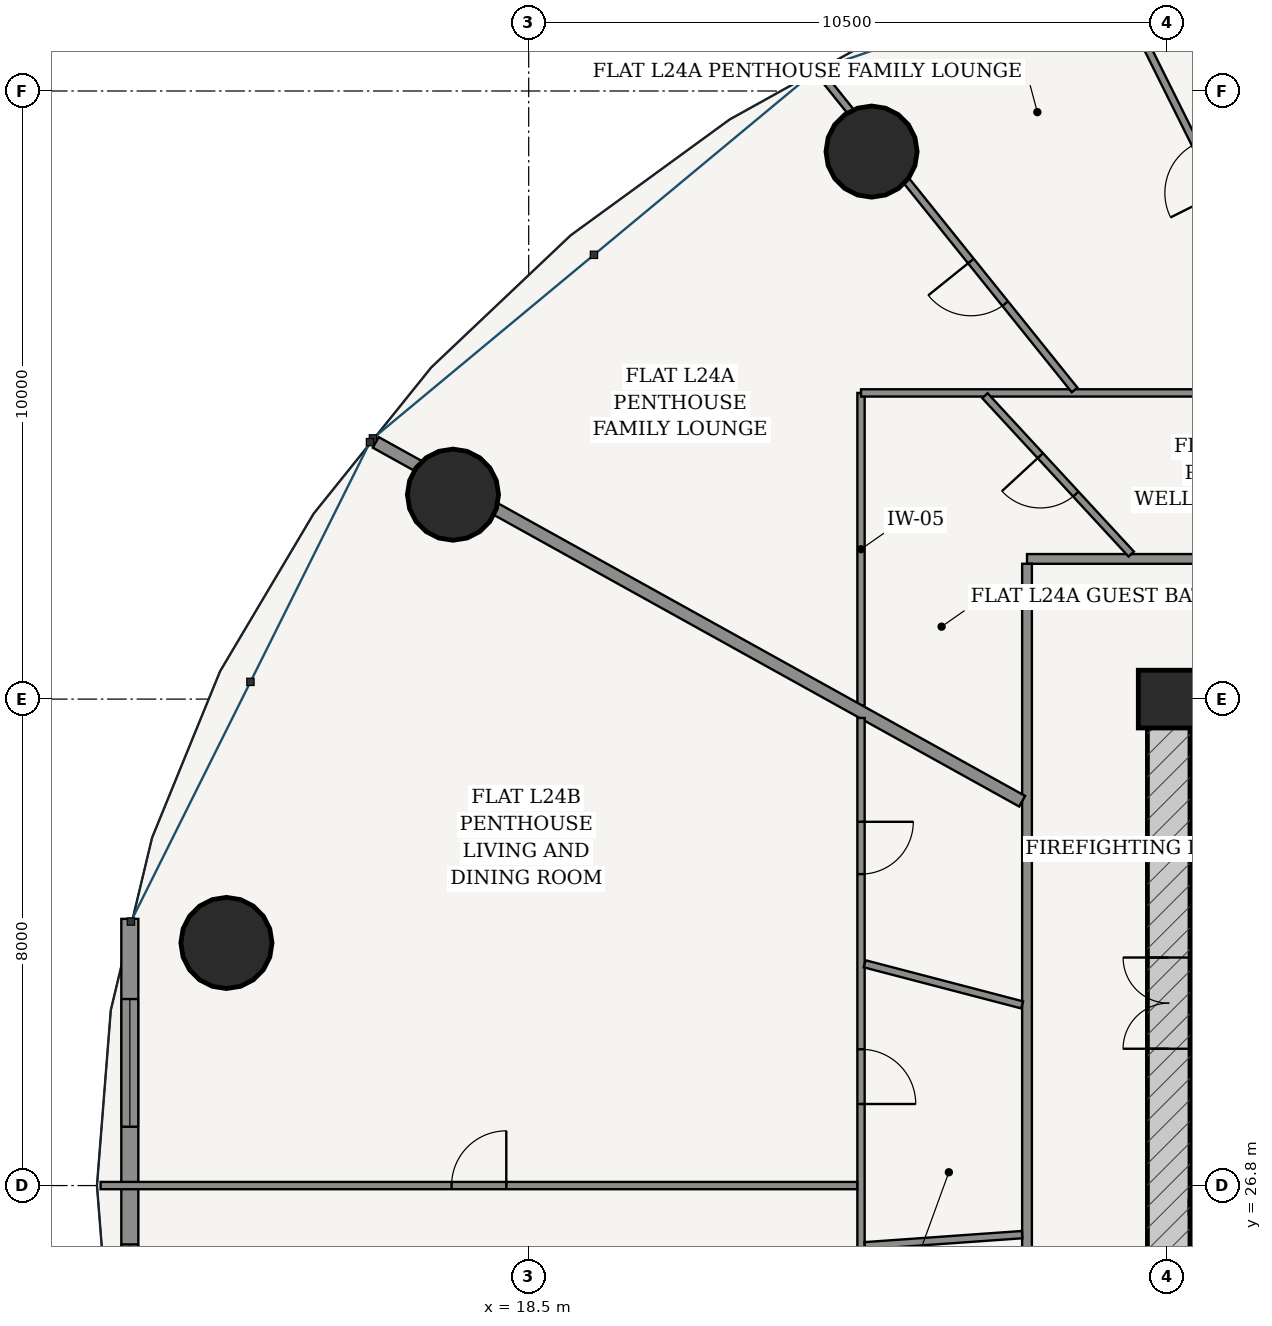
"""IFC4 building model, lengths in metres.
Left out: names, types, materials, properties, quantities, classifications, styles, units other than length and angle.
Written with IfcOpenShell. Run it as: python <this file> out.ifc"""

import sys

from ifc_helpers import new_model, si_unit, direction, frame, frame_2d, origin, origin_2d, place, context, subcontext, project, spatial, rectangle, hollow_circle, extrude, source, transform, mapped, element, fill, save


model = new_model("IFC4")
c1 = context("Model", 3, precision=1e-05, world=origin(), true_north=direction((-0.2419218956, 0.970295726276)))
c2 = subcontext(c1, "Body", "Model", "MODEL_VIEW")
j1 = project(units=[si_unit("LENGTHUNIT", "METRE"), si_unit("PLANEANGLEUNIT", "RADIAN")], contexts=[c1])
p1 = place(None, origin())
s1 = spatial("IfcSite", under=j1, at=p1, CompositionType="ELEMENT")
p2 = place(p1, origin())
s2 = spatial("IfcBuilding", under=s1, at=p2, CompositionType="ELEMENT")
p3 = place(p2, frame((0.0, 0.0, 94.2)))
s3 = spatial("IfcBuildingStorey", under=s2, at=p3, CompositionType="ELEMENT", Elevation=94.2)
p4 = place(p3, frame((29.0, 34.8, 0.0), z_axis=(0.0, 0.0, 1.0), x_axis=(1.0, 0.0, 0.0)))
e1 = element("IfcColumn", 1, at=p4, inside=s3, PredefinedType="COLUMN", context=c2, shape_type="SweptSolid", body=[
    extrude(rectangle(XDim=0.95, YDim=0.95, at=origin_2d()), origin(), (0.0, 0.0, 1.0), 3.6),
])
p5 = place(p3, frame((28.675, 34.775, 0.0), z_axis=(0.0, 0.0, 1.0), x_axis=(1.0, 0.0, 0.0)))
e2 = element("IfcWall", 2, at=p5, inside=s3, PredefinedType="SHEAR", context=c2, shape_type="SweptSolid", body=[
    extrude(rectangle(XDim=18.65, YDim=0.7, at=frame_2d((9.325, 0.0))), origin(), (0.0, 0.0, 1.0), 3.325),
])
p6 = place(p5, frame((8.9, 0.0, 0.0)))
e3 = element("IfcOpeningElement", 3, at=p6, cuts=e2, PredefinedType="OPENING", context=c2, shape_type="SweptSolid", body=[
    extrude(rectangle(XDim=0.85, YDim=2.1, at=frame_2d((0.425, 1.05))), frame((0.0, 0.36, 0.0), z_axis=(0.0, -1.0, 0.0), x_axis=(1.0, 0.0, 0.0)), (0.0, 0.0, 1.0), 0.72),
])
p7 = place(p3, frame((29.025, 19.175, 0.0), z_axis=(0.0, 0.0, 1.0), x_axis=(0.0, 1.0, 0.0)))
e4 = element("IfcWall", 4, at=p7, inside=s3, PredefinedType="SHEAR", context=c2, shape_type="SweptSolid", body=[
    extrude(rectangle(XDim=15.25, YDim=0.7, at=frame_2d((7.625, 0.0))), origin(), (0.0, 0.0, 1.0), 3.325),
])
p8 = place(p7, frame((9.875, 0.0, 0.0)))
e5 = element("IfcOpeningElement", 5, at=p8, cuts=e4, PredefinedType="OPENING", context=c2, shape_type="SweptSolid", body=[
    extrude(rectangle(XDim=1.5, YDim=2.2, at=frame_2d((0.75, 1.1))), frame((0.0, 0.36, 0.0), z_axis=(0.0, -1.0, 0.0), x_axis=(1.0, 0.0, 0.0)), (0.0, 0.0, 1.0), 0.72),
])
p9 = place(p3, frame((29.375, 26.45, 0.0), z_axis=(0.0, 0.0, 1.0), x_axis=(1.0, 0.0, 0.0)))
e6 = element("IfcWall", 6, at=p9, inside=s3, PredefinedType="SOLIDWALL", context=c2, shape_type="SweptSolid", body=[
    extrude(rectangle(XDim=3.32, YDim=0.2, at=frame_2d((1.66, 0.0))), origin(), (0.0, 0.0, 1.0), 3.325),
])
p10 = place(p9, frame((1.185, 0.0, 0.0)))
e7 = element("IfcOpeningElement", 7, at=p10, cuts=e6, PredefinedType="OPENING", context=c2, shape_type="SweptSolid", body=[
    extrude(rectangle(XDim=0.95, YDim=2.15, at=frame_2d((0.475, 1.075))), frame((0.0, 0.11, 0.0), z_axis=(0.0, -1.0, 0.0), x_axis=(1.0, 0.0, 0.0)), (0.0, 0.0, 1.0), 0.22),
])
for number, where, z_axis, x_axis in (
    (8, (24.138, 43.803, 0.0), (0.0, 0.0, 1.0), (1.0, 0.0, 0.0)),
    (9, (17.255, 38.161, 0.0), (0.0, 0.0, 1.0), (1.0, 0.0, 0.0)),
    (10, (13.529, 30.79, 0.0), (0.0, 0.0, 1.0), (1.0, 0.0, 0.0)),
):
    element("IfcColumn", number, at=place(p3, frame(where, z_axis=z_axis, x_axis=x_axis)), inside=s3, PredefinedType="COLUMN", context=c2, shape_type="SweptSolid", body=[
        extrude(hollow_circle(Radius=0.75, WallThickness=0.045, at=origin_2d()), origin(), (0.0, 0.0, 1.0), 3.6),
    ])
p11 = place(p3, frame((11.94, 31.186, 0.0), z_axis=(0.0, 0.0, 1.0), x_axis=(0.0, -1.0, 0.0)))
e11 = element("IfcWall", 11, at=p11, inside=s3, PredefinedType="SOLIDWALL", context=c2, shape_type="SweptSolid", body=[
    extrude(rectangle(XDim=8.771, YDim=0.28, at=frame_2d((4.386, 0.0))), origin(), (0.0, 0.0, 1.0), 3.325),
])
p12 = place(p11, frame((1.318, 0.0, 0.85)))
e12 = element("IfcOpeningElement", 12, at=p12, cuts=e11, PredefinedType="OPENING", context=c2, shape_type="SweptSolid", body=[
    extrude(rectangle(XDim=2.1, YDim=1.95, at=frame_2d((1.05, 0.975))), frame((0.0, 0.15, 0.0), z_axis=(0.0, -1.0, 0.0), x_axis=(1.0, 0.0, 0.0)), (0.0, 0.0, 1.0), 0.3),
])
p13 = place(p11, frame((5.353, 0.0, 0.85)))
e13 = element("IfcOpeningElement", 13, at=p13, cuts=e11, PredefinedType="OPENING", context=c2, shape_type="SweptSolid", body=[
    extrude(rectangle(XDim=2.1, YDim=1.95, at=frame_2d((1.05, 0.975))), frame((0.0, 0.15, 0.0), z_axis=(0.0, -1.0, 0.0), x_axis=(1.0, 0.0, 0.0)), (0.0, 0.0, 1.0), 0.3),
])
p14 = place(p3, frame((26.695, 37.105, 0.0), z_axis=(0.0, 0.0, 1.0), x_axis=(1.0, 0.0, 0.0)))
e14 = element("IfcWall", 14, at=p14, inside=s3, PredefinedType="PARTITIONING", context=c2, shape_type="SweptSolid", body=[
    extrude(rectangle(XDim=22.61, YDim=0.16, at=frame_2d((11.305, 0.0))), origin(), (0.0, 0.0, 1.0), 2.767),
])
p15 = place(p14, frame((18.058, 0.0, 0.0)))
e15 = element("IfcOpeningElement", 15, at=p15, cuts=e14, PredefinedType="OPENING", context=c2, shape_type="SweptSolid", body=[
    extrude(rectangle(XDim=0.98, YDim=2.2, at=frame_2d((0.49, 1.1))), frame((0.0, 0.09, 0.0), z_axis=(0.0, -1.0, 0.0), x_axis=(1.0, 0.0, 0.0)), (0.0, 0.0, 1.0), 0.18),
])
p16 = place(p3, frame((26.695, 16.575, 0.0), z_axis=(0.0, 0.0, 1.0), x_axis=(0.0, 1.0, 0.0)))
e16 = element("IfcWall", 16, at=p16, inside=s3, PredefinedType="PARTITIONING", context=c2, shape_type="SweptSolid", body=[
    extrude(rectangle(XDim=20.45, YDim=0.16, at=frame_2d((10.225, 0.0))), origin(), (0.0, 0.0, 1.0), 2.767),
])
p17 = place(p3, frame((23.965, 34.693, 0.0), z_axis=(0.0, 0.0, 1.0), x_axis=(0.0, 1.0, 0.0)))
e17 = element("IfcWall", 17, at=p17, inside=s3, PredefinedType="PARTITIONING", context=c2, shape_type="SweptSolid", body=[
    extrude(rectangle(XDim=5.142, YDim=0.12, at=frame_2d((2.571, 0.0))), origin(), (0.0, 0.0, 1.0), 3.004),
])
p18 = place(p3, frame((23.965, 39.835, 0.0), z_axis=(0.0, 0.0, 1.0), x_axis=(1.0, 0.0, 0.0)))
e18 = element("IfcWall", 18, at=p18, inside=s3, PredefinedType="PARTITIONING", context=c2, shape_type="SweptSolid", body=[
    extrude(rectangle(XDim=28.07, YDim=0.12, at=frame_2d((14.035, 0.0))), origin(), (0.0, 0.0, 1.0), 2.767),
])
p19 = place(p18, frame((23.442, 0.0, 0.0)))
e19 = element("IfcOpeningElement", 19, at=p19, cuts=e18, PredefinedType="OPENING", context=c2, shape_type="SweptSolid", body=[
    extrude(rectangle(XDim=0.9, YDim=2.15, at=frame_2d((0.45, 1.075))), frame((0.0, 0.07, 0.0), z_axis=(0.0, -1.0, 0.0), x_axis=(1.0, 0.0, 0.0)), (0.0, 0.0, 1.0), 0.14),
])
p20 = place(p3, frame((31.474, 39.89, 0.0), z_axis=(0.0, 0.0, 1.0), x_axis=(-0.446167584581, 0.894949432353, 0.0)))
e20 = element("IfcWall", 20, at=p20, inside=s3, PredefinedType="PARTITIONING", context=c2, shape_type="SweptSolid", body=[
    extrude(rectangle(XDim=8.125, YDim=0.12, at=frame_2d((4.062, 0.0))), origin(), (0.0, 0.0, 1.0), 2.767),
])
p21 = place(p20, frame((3.612, 0.0, 0.0)))
e21 = element("IfcOpeningElement", 21, at=p21, cuts=e20, PredefinedType="OPENING", context=c2, shape_type="SweptSolid", body=[
    extrude(rectangle(XDim=0.9, YDim=2.15, at=frame_2d((0.45, 1.075))), frame((0.0, 0.07, 0.0), z_axis=(0.0, -1.0, 0.0), x_axis=(1.0, 0.0, 0.0)), (0.0, 0.0, 1.0), 0.14),
])
p22 = place(p3, frame((27.478, 39.883, 0.0), z_axis=(0.0, 0.0, 1.0), x_axis=(-0.62672583251, 0.779239841682, 0.0)))
e22 = element("IfcWall", 22, at=p22, inside=s3, PredefinedType="PARTITIONING", context=c2, shape_type="SweptSolid", body=[
    extrude(rectangle(XDim=6.678, YDim=0.12, at=frame_2d((3.339, 0.0))), origin(), (0.0, 0.0, 1.0), 2.767),
])
p23 = place(p22, frame((1.821, 0.0, 0.0)))
e23 = element("IfcOpeningElement", 23, at=p23, cuts=e22, PredefinedType="OPENING", context=c2, shape_type="SweptSolid", body=[
    extrude(rectangle(XDim=0.9, YDim=2.15, at=frame_2d((0.45, 1.075))), frame((0.0, 0.07, 0.0), z_axis=(0.0, -1.0, 0.0), x_axis=(1.0, 0.0, 0.0)), (0.0, 0.0, 1.0), 0.14),
])
p24 = place(p3, frame((28.409, 37.185, 0.0), z_axis=(0.0, 0.0, 1.0), x_axis=(-0.678451695105, 0.734645014554, 0.0)))
e24 = element("IfcWall", 24, at=p24, inside=s3, PredefinedType="PARTITIONING", context=c2, shape_type="SweptSolid", body=[
    extrude(rectangle(XDim=3.545, YDim=0.12, at=frame_2d((1.772, 0.0))), origin(), (0.0, 0.0, 1.0), 2.767),
])
p25 = place(p24, frame((1.343, 0.0, 0.0)))
e25 = element("IfcOpeningElement", 25, at=p25, cuts=e24, PredefinedType="OPENING", context=c2, shape_type="SweptSolid", body=[
    extrude(rectangle(XDim=0.86, YDim=2.15, at=frame_2d((0.43, 1.075))), frame((0.0, 0.07, 0.0), z_axis=(0.0, -1.0, 0.0), x_axis=(1.0, 0.0, 0.0)), (0.0, 0.0, 1.0), 0.14),
])
p26 = place(p3, frame((26.615, 33.12, 0.0), z_axis=(0.0, 0.0, 1.0), x_axis=(-0.874319192772, 0.485351366692, 0.0)))
e26 = element("IfcWall", 26, at=p26, inside=s3, PredefinedType="PARTITIONING", context=c2, shape_type="SweptSolid", body=[
    extrude(rectangle(XDim=12.158, YDim=0.2, at=frame_2d((6.079, 0.0))), origin(), (0.0, 0.0, 1.0), 2.767),
])
p27 = place(p3, frame((23.965, 13.765, 0.0), z_axis=(0.0, 0.0, 1.0), x_axis=(0.0, 1.0, 0.0)))
e27 = element("IfcWall", 27, at=p27, inside=s3, PredefinedType="PARTITIONING", context=c2, shape_type="SweptSolid", body=[
    extrude(rectangle(XDim=20.725, YDim=0.12, at=frame_2d((10.362, 0.0))), origin(), (0.0, 0.0, 1.0), 2.767),
])
p28 = place(p27, frame((9.401, 0.0, 0.0)))
e28 = element("IfcOpeningElement", 28, at=p28, cuts=e27, PredefinedType="OPENING", context=c2, shape_type="SweptSolid", body=[
    extrude(rectangle(XDim=0.9, YDim=2.15, at=frame_2d((0.45, 1.075))), frame((0.0, 0.07, 0.0), z_axis=(0.0, -1.0, 0.0), x_axis=(1.0, 0.0, 0.0)), (0.0, 0.0, 1.0), 0.14),
])
p29 = place(p27, frame((18.157, 0.0, 0.0)))
e29 = element("IfcOpeningElement", 29, at=p29, cuts=e27, PredefinedType="OPENING", context=c2, shape_type="SweptSolid", body=[
    extrude(rectangle(XDim=0.86, YDim=2.15, at=frame_2d((0.43, 1.075))), frame((0.0, 0.07, 0.0), z_axis=(0.0, -1.0, 0.0), x_axis=(1.0, 0.0, 0.0)), (0.0, 0.0, 1.0), 0.14),
])
p30 = place(p27, frame((14.376, 0.0, 0.0)))
e30 = element("IfcOpeningElement", 30, at=p30, cuts=e27, PredefinedType="OPENING", context=c2, shape_type="SweptSolid", body=[
    extrude(rectangle(XDim=0.9, YDim=2.15, at=frame_2d((0.45, 1.075))), frame((0.0, 0.07, 0.0), z_axis=(0.0, -1.0, 0.0), x_axis=(1.0, 0.0, 0.0)), (0.0, 0.0, 1.0), 0.14),
])
p31 = place(p3, frame((23.903, 26.8, 0.0), z_axis=(0.0, 0.0, 1.0), x_axis=(-1.0, 0.0, 0.0)))
e31 = element("IfcWall", 31, at=p31, inside=s3, PredefinedType="PARTITIONING", context=c2, shape_type="SweptSolid", body=[
    extrude(rectangle(XDim=12.443, YDim=0.12, at=frame_2d((6.222, 0.0))), origin(), (0.0, 0.0, 1.0), 2.767),
])
p32 = place(p31, frame((5.771, 0.0, 0.0)))
e32 = element("IfcOpeningElement", 32, at=p32, cuts=e31, PredefinedType="OPENING", context=c2, shape_type="SweptSolid", body=[
    extrude(rectangle(XDim=0.9, YDim=2.15, at=frame_2d((0.45, 1.075))), frame((0.0, 0.07, 0.0), z_axis=(0.0, -1.0, 0.0), x_axis=(1.0, 0.0, 0.0)), (0.0, 0.0, 1.0), 0.14),
])
p33 = place(p3, frame((26.615, 29.771, 0.0), z_axis=(0.0, 0.0, 1.0), x_axis=(-0.967585302816, 0.252544415449, 0.0)))
e33 = element("IfcWall", 33, at=p33, inside=s3, PredefinedType="PARTITIONING", context=c2, shape_type="SweptSolid", body=[
    extrude(rectangle(XDim=2.677, YDim=0.12, at=frame_2d((1.338, 0.0))), origin(), (0.0, 0.0, 1.0), 3.325),
])
p34 = place(p3, frame((26.615, 25.993, 0.0), z_axis=(0.0, 0.0, 1.0), x_axis=(-0.997500084777, -0.070665273433, 0.0)))
e34 = element("IfcWall", 34, at=p34, inside=s3, PredefinedType="PARTITIONING", context=c2, shape_type="SweptSolid", body=[
    extrude(rectangle(XDim=2.595, YDim=0.12, at=frame_2d((1.297, 0.0))), origin(), (0.0, 0.0, 1.0), 3.325),
])
m1 = source(origin(), c2, "Body", "SweptSolid", [
    extrude(rectangle(XDim=2.1, YDim=1.95, at=frame_2d((1.05, 0.975))), frame((0.0, 0.03, 0.0), z_axis=(0.0, -1.0, 0.0), x_axis=(1.0, 0.0, 0.0)), (0.0, 0.0, 1.0), 0.06),
])
p35 = place(p12, origin())
e35 = element("IfcWindow", 35, at=p35, inside=s3, PartitioningType="SINGLE_PANEL", PredefinedType="WINDOW", context=c2, shape_type="MappedRepresentation", body=[
    mapped(m1, transform((0.0, 0.0, 0.0), scale=1.0)),
])
fill(e12, e35)
p36 = place(p13, origin())
e36 = element("IfcWindow", 36, at=p36, inside=s3, PartitioningType="SINGLE_PANEL", PredefinedType="WINDOW", context=c2, shape_type="MappedRepresentation", body=[
    mapped(m1, transform((0.0, 0.0, 0.0), scale=1.0)),
])
fill(e13, e36)
m2 = source(origin(), c2, "Body", "SweptSolid", [
    extrude(rectangle(XDim=1.5, YDim=2.2, at=frame_2d((0.75, 1.1))), frame((0.0, 0.025, 0.0), z_axis=(0.0, -1.0, 0.0), x_axis=(1.0, 0.0, 0.0)), (0.0, 0.0, 1.0), 0.05),
])
p37 = place(p8, origin())
e37 = element("IfcDoor", 37, at=p37, inside=s3, OperationType="DOUBLE_DOOR_SINGLE_SWING", PredefinedType="DOOR", context=c2, shape_type="MappedRepresentation", body=[
    mapped(m2, transform((0.0, 0.0, 0.0), scale=1.0)),
])
fill(e5, e37)
m3 = source(origin(), c2, "Body", "SweptSolid", [
    extrude(rectangle(XDim=0.86, YDim=2.15, at=frame_2d((0.43, 1.075))), frame((0.0, 0.025, 0.0), z_axis=(0.0, -1.0, 0.0), x_axis=(1.0, 0.0, 0.0)), (0.0, 0.0, 1.0), 0.05),
])
p38 = place(p25, origin())
e38 = element("IfcDoor", 38, at=p38, inside=s3, OperationType="SINGLE_SWING_RIGHT", PredefinedType="DOOR", context=c2, shape_type="MappedRepresentation", body=[
    mapped(m3, transform((0.0, 0.0, 0.0), scale=1.0)),
])
fill(e25, e38)
m4 = source(origin(), c2, "Body", "SweptSolid", [
    extrude(rectangle(XDim=0.9, YDim=2.15, at=frame_2d((0.45, 1.075))), frame((0.0, 0.025, 0.0), z_axis=(0.0, -1.0, 0.0), x_axis=(1.0, 0.0, 0.0)), (0.0, 0.0, 1.0), 0.05),
])
p39 = place(p23, origin())
e39 = element("IfcDoor", 39, at=p39, inside=s3, OperationType="SINGLE_SWING_RIGHT", PredefinedType="DOOR", context=c2, shape_type="MappedRepresentation", body=[
    mapped(m4, transform((0.0, 0.0, 0.0), scale=1.0)),
])
fill(e23, e39)
p40 = place(p32, frame((0.9, 0.0, 0.0), z_axis=(0.0, 0.0, 1.0), x_axis=(-1.0, 0.0, 0.0)))
e40 = element("IfcDoor", 40, at=p40, inside=s3, OperationType="SINGLE_SWING_RIGHT", PredefinedType="DOOR", context=c2, shape_type="MappedRepresentation", body=[
    mapped(m4, transform((0.0, 0.0, 0.0), scale=1.0)),
])
fill(e32, e40)
p41 = place(p29, frame((0.86, 0.0, 0.0), z_axis=(0.0, 0.0, 1.0), x_axis=(-1.0, 0.0, 0.0)))
e41 = element("IfcDoor", 41, at=p41, inside=s3, OperationType="SINGLE_SWING_LEFT", PredefinedType="DOOR", context=c2, shape_type="MappedRepresentation", body=[
    mapped(m3, transform((0.0, 0.0, 0.0), scale=1.0)),
])
fill(e29, e41)
p42 = place(p30, frame((0.9, 0.0, 0.0), z_axis=(0.0, 0.0, 1.0), x_axis=(-1.0, 0.0, 0.0)))
e42 = element("IfcDoor", 42, at=p42, inside=s3, OperationType="SINGLE_SWING_RIGHT", PredefinedType="DOOR", context=c2, shape_type="MappedRepresentation", body=[
    mapped(m4, transform((0.0, 0.0, 0.0), scale=1.0)),
])
fill(e30, e42)
save(model, sys.argv[1])
